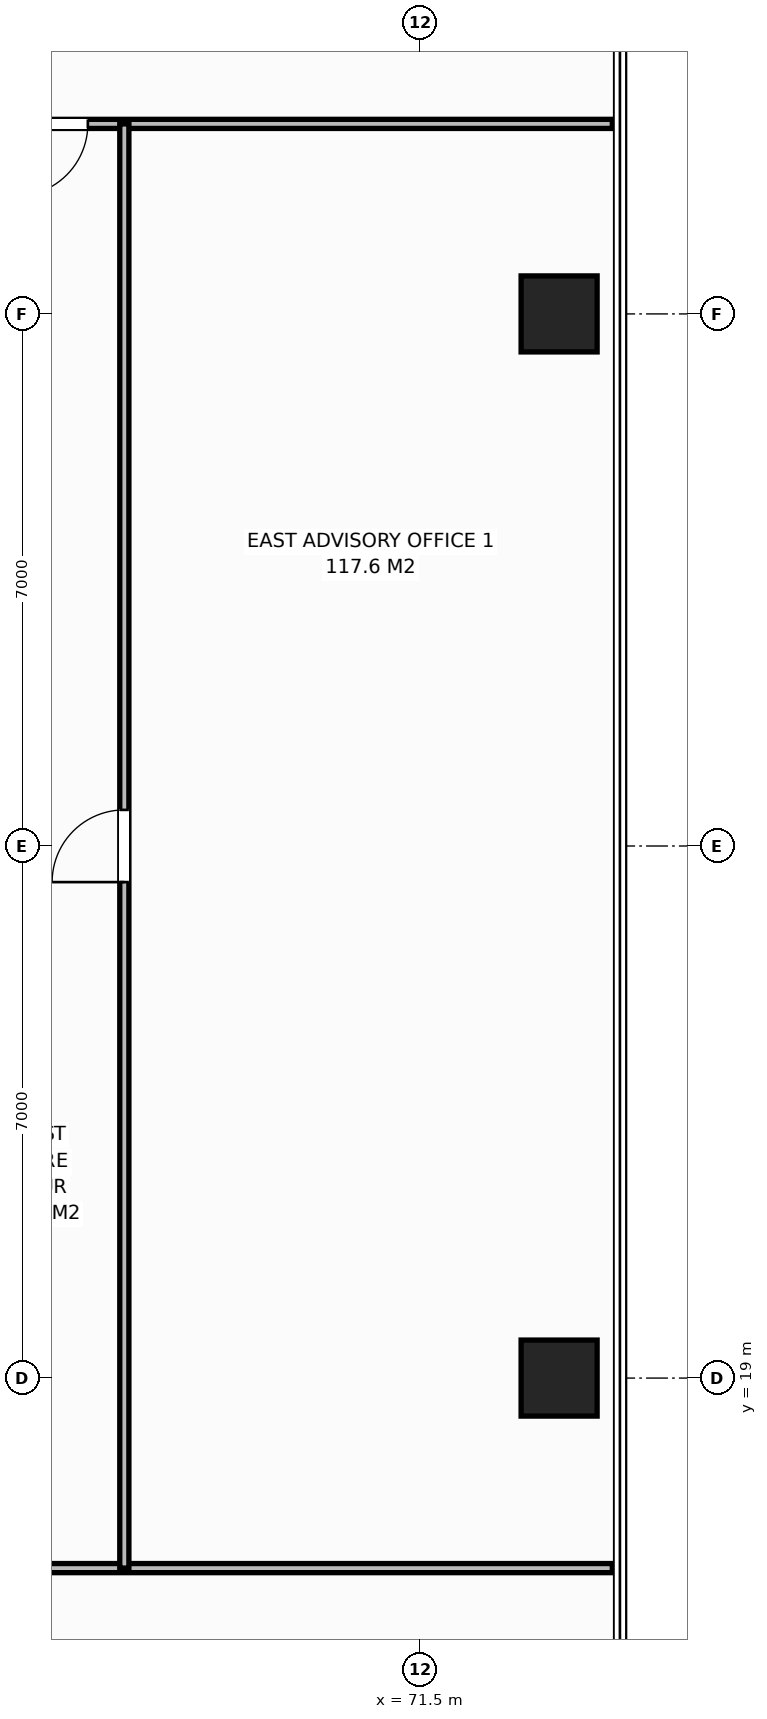
"""IFC4 building model, lengths in metres.
Left out: names, types, materials, properties, quantities, classifications, styles, units other than length and angle.
Written with IfcOpenShell. Run it as: python <this file> out.ifc"""

import sys

from ifc_helpers import new_model, si_unit, direction, frame, frame_2d, origin, origin_2d, place, context, subcontext, project, spatial, rectangle, extrude, element, fill, save


model = new_model("IFC4")
c1 = context("Model", 3, precision=1e-05, world=origin(), true_north=direction((0.0, 1.0)))
c2 = subcontext(c1, "Body", "Model", "MODEL_VIEW")
j1 = project(units=[si_unit("LENGTHUNIT", "METRE"), si_unit("PLANEANGLEUNIT", "RADIAN")], contexts=[c1])
p1 = place(None, origin())
s1 = spatial("IfcSite", under=j1, at=p1, CompositionType="ELEMENT")
p2 = place(p1, origin())
s2 = spatial("IfcBuilding", under=s1, at=p2, CompositionType="ELEMENT")
p3 = place(p2, frame((0.0, 0.0, 155.6)))
s3 = spatial("IfcBuildingStorey", under=s2, at=p3, CompositionType="ELEMENT", Elevation=155.6)
for number, where, z_axis, x_axis in (
    (1, (73.32, 19.0, 0.0), (0.0, 0.0, 1.0), (1.0, 0.0, 0.0)),
    (2, (73.32, 33.0, 0.0), (0.0, 0.0, 1.0), (1.0, 0.0, 0.0)),
):
    element("IfcColumn", number, at=place(p3, frame(where, z_axis=z_axis, x_axis=x_axis)), inside=s3, PredefinedType="COLUMN", context=c2, shape_type="SweptSolid", body=[
        extrude(rectangle(XDim=1.0, YDim=1.0, at=origin_2d()), origin(), (0.0, 0.0, 1.0), 3.8),
    ])
p4 = place(p3, frame((63.483, 35.5, 0.0), z_axis=(0.0, 0.0, 1.0), x_axis=(1.0, 0.0, 0.0)))
e3 = element("IfcWall", 3, at=p4, inside=s3, PredefinedType="PARTITIONING", context=c2, shape_type="SweptSolid", body=[
    extrude(rectangle(XDim=10.537, YDim=0.12, at=frame_2d((5.269, 0.0))), origin(), (0.0, 0.0, 1.0), 3.572),
])
p5 = place(p4, frame((2.687, 0.0, 0.0)))
e4 = element("IfcOpeningElement", 4, at=p5, cuts=e3, PredefinedType="OPENING", context=c2, shape_type="SweptSolid", body=[
    extrude(rectangle(XDim=0.95, YDim=2.15, at=frame_2d((0.475, 1.075))), frame((0.0, 0.07, 0.0), z_axis=(0.0, -1.0, 0.0), x_axis=(1.0, 0.0, 0.0)), (0.0, 0.0, 1.0), 0.14),
])
p6 = place(p3, frame((59.968, 16.5, 0.0), z_axis=(0.0, 0.0, 1.0), x_axis=(1.0, 0.0, 0.0)))
e5 = element("IfcWall", 5, at=p6, inside=s3, PredefinedType="PARTITIONING", context=c2, shape_type="SweptSolid", body=[
    extrude(rectangle(XDim=14.052, YDim=0.12, at=frame_2d((7.026, 0.0))), origin(), (0.0, 0.0, 1.0), 3.572),
])
p7 = place(p6, frame((0.48, 0.0, 0.0)))
e6 = element("IfcOpeningElement", 6, at=p7, cuts=e5, PredefinedType="OPENING", context=c2, shape_type="SweptSolid", body=[
    extrude(rectangle(XDim=0.95, YDim=2.15, at=frame_2d((0.475, 1.075))), frame((0.0, 0.07, 0.0), z_axis=(0.0, -1.0, 0.0), x_axis=(1.0, 0.0, 0.0)), (0.0, 0.0, 1.0), 0.14),
])
p8 = place(p3, frame((67.6, 16.5, 0.0), z_axis=(0.0, 0.0, 1.0), x_axis=(0.0, 1.0, 0.0)))
e7 = element("IfcWall", 7, at=p8, inside=s3, PredefinedType="PARTITIONING", context=c2, shape_type="SweptSolid", body=[
    extrude(rectangle(XDim=19.0, YDim=0.12, at=frame_2d((9.5, 0.0))), origin(), (0.0, 0.0, 1.0), 3.572),
])
p9 = place(p8, frame((9.025, 0.0, 0.0)))
e8 = element("IfcOpeningElement", 8, at=p9, cuts=e7, PredefinedType="OPENING", context=c2, shape_type="SweptSolid", body=[
    extrude(rectangle(XDim=0.95, YDim=2.15, at=frame_2d((0.475, 1.075))), frame((0.0, 0.07, 0.0), z_axis=(0.0, -1.0, 0.0), x_axis=(1.0, 0.0, 0.0)), (0.0, 0.0, 1.0), 0.14),
])
p10 = place(p5, origin())
e9 = element("IfcDoor", 9, at=p10, inside=s3, OperationType="SINGLE_SWING_RIGHT", PredefinedType="DOOR", context=c2, shape_type="SweptSolid", body=[
    extrude(rectangle(XDim=0.95, YDim=2.15, at=frame_2d((0.475, 1.075))), frame((0.0, 0.025, 0.0), z_axis=(0.0, -1.0, 0.0), x_axis=(1.0, 0.0, 0.0)), (0.0, 0.0, 1.0), 0.05),
])
fill(e4, e9)
p11 = place(p9, origin())
e10 = element("IfcDoor", 10, at=p11, inside=s3, OperationType="SINGLE_SWING_LEFT", PredefinedType="DOOR", context=c2, shape_type="SweptSolid", body=[
    extrude(rectangle(XDim=0.95, YDim=2.15, at=frame_2d((0.475, 1.075))), frame((0.0, 0.025, 0.0), z_axis=(0.0, -1.0, 0.0), x_axis=(1.0, 0.0, 0.0)), (0.0, 0.0, 1.0), 0.05),
])
fill(e8, e10)
save(model, sys.argv[1])
